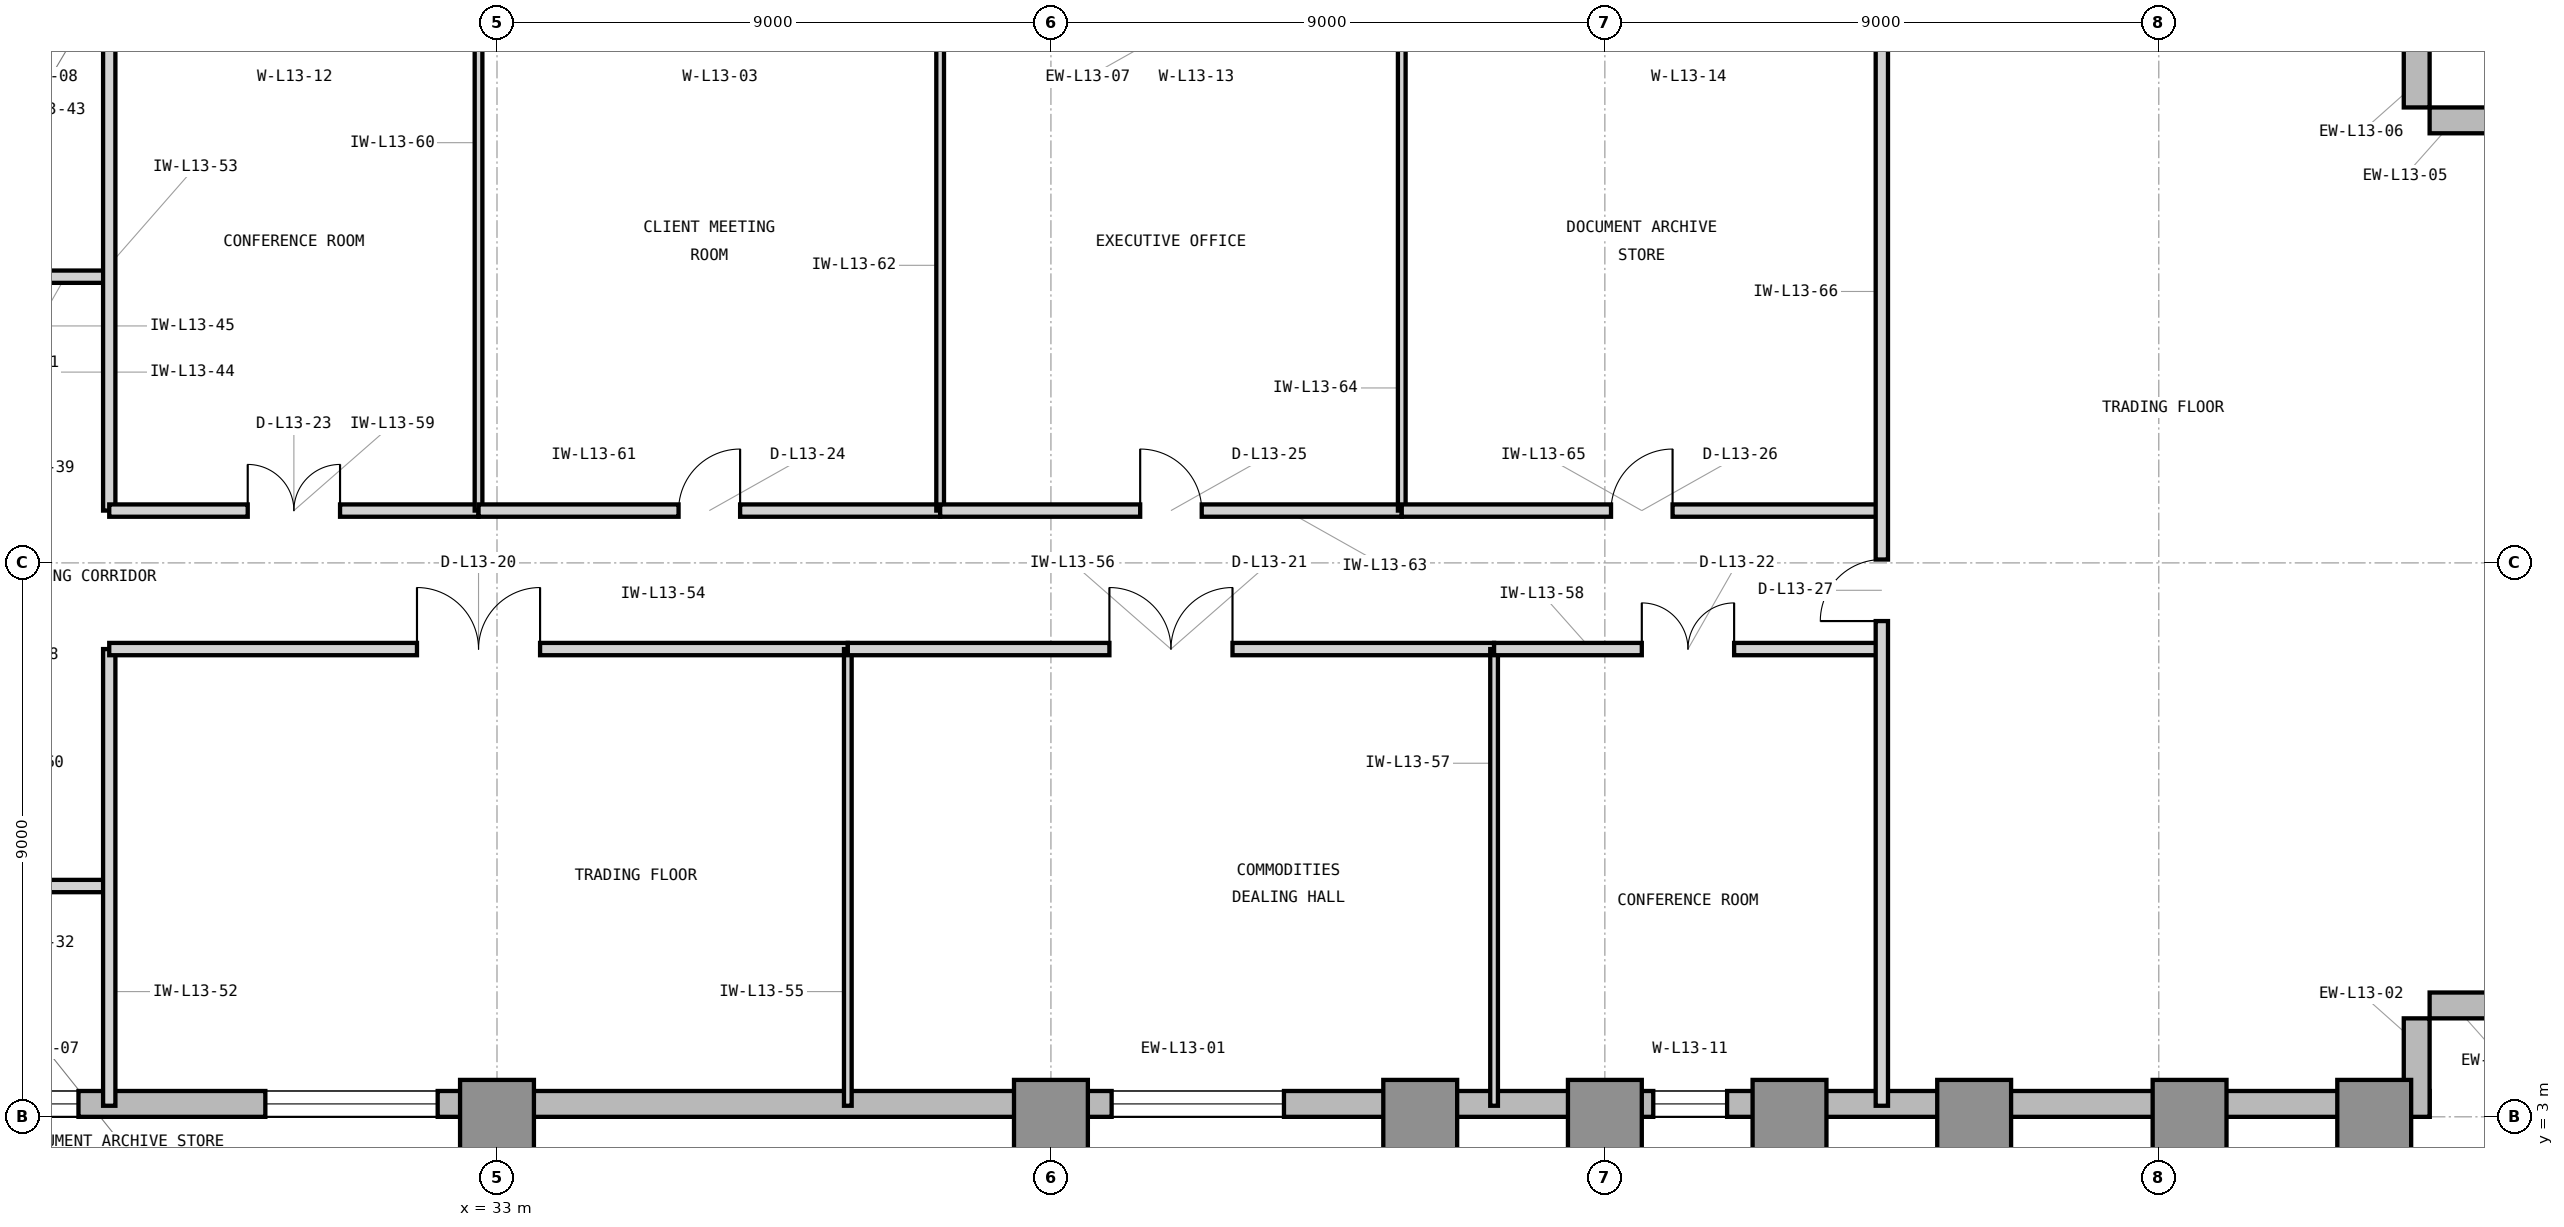
"""IFC4 building model, lengths in metres.
Left out: names, types, materials, properties, quantities, classifications, styles, units other than length and angle.
Written with IfcOpenShell. Run it as: python <this file> out.ifc"""

import sys

from ifc_helpers import new_model, si_unit, direction, frame, frame_2d, origin, origin_2d, place, context, subcontext, project, spatial, rectangle, extrude, element, fill, save


model = new_model("IFC4")
c1 = context("Model", 3, precision=1e-05, world=origin(), true_north=direction((0.0, 1.0)))
c2 = subcontext(c1, "Body", "Model", "MODEL_VIEW")
j1 = project(units=[si_unit("LENGTHUNIT", "METRE"), si_unit("PLANEANGLEUNIT", "RADIAN")], contexts=[c1])
p1 = place(None, origin())
s1 = spatial("IfcSite", under=j1, at=p1, CompositionType="ELEMENT")
p2 = place(p1, origin())
s2 = spatial("IfcBuilding", under=s1, at=p2, CompositionType="ELEMENT")
p3 = place(p2, frame((0.0, 0.0, 59.4)))
s3 = spatial("IfcBuildingStorey", under=s2, at=p3, CompositionType="ELEMENT", Elevation=59.4)
for number, where, z_axis, x_axis in (
    (1, (33.0, 3.0, 0.0), (0.0, 0.0, 1.0), (1.0, 0.0, 0.0)),
    (2, (42.0, 3.0, 0.0), (0.0, 0.0, 1.0), (1.0, 0.0, 0.0)),
    (3, (48.0, 3.0, 0.0), (0.0, 0.0, 1.0), (1.0, 0.0, 0.0)),
    (4, (51.0, 3.0, 0.0), (0.0, 0.0, 1.0), (1.0, 0.0, 0.0)),
    (5, (54.0, 3.0, 0.0), (0.0, 0.0, 1.0), (1.0, 0.0, 0.0)),
    (6, (57.0, 3.0, 0.0), (0.0, 0.0, 1.0), (1.0, 0.0, 0.0)),
    (7, (60.5, 3.0, 0.0), (0.0, 0.0, 1.0), (1.0, 0.0, 0.0)),
    (8, (63.5, 3.0, 0.0), (0.0, 0.0, 1.0), (1.0, 0.0, 0.0)),
):
    element("IfcColumn", number, at=place(p3, frame(where, z_axis=z_axis, x_axis=x_axis)), inside=s3, PredefinedType="COLUMN", context=c2, shape_type="SweptSolid", body=[
        extrude(rectangle(XDim=1.2, YDim=1.2, at=origin_2d()), origin(), (0.0, 0.0, 1.0), 4.2),
    ])
p4 = place(p3, frame((23.9, 3.21, 0.0), z_axis=(0.0, 0.0, 1.0), x_axis=(1.0, 0.0, 0.0)))
e9 = element("IfcWall", 9, at=p4, inside=s3, PredefinedType="STANDARD", context=c2, shape_type="SweptSolid", body=[
    extrude(rectangle(XDim=40.5, YDim=0.42, at=frame_2d((20.25, 0.0))), origin(), (0.0, 0.0, 1.0), 3.98),
])
p5 = place(p4, frame((1.1, 0.0, 0.85)))
e10 = element("IfcOpeningElement", 10, at=p5, cuts=e9, PredefinedType="OPENING", context=c2, shape_type="SweptSolid", body=[
    extrude(rectangle(XDim=1.2, YDim=2.45, at=frame_2d((0.6, 1.225))), frame((0.0, 0.22, 0.0), z_axis=(0.0, -1.0, 0.0), x_axis=(1.0, 0.0, 0.0)), (0.0, 0.0, 1.0), 0.44),
])
p6 = place(p4, frame((5.336, 0.0, 0.85)))
e11 = element("IfcOpeningElement", 11, at=p6, cuts=e9, PredefinedType="OPENING", context=c2, shape_type="SweptSolid", body=[
    extrude(rectangle(XDim=2.8, YDim=2.45, at=frame_2d((1.4, 1.225))), frame((0.0, 0.22, 0.0), z_axis=(0.0, -1.0, 0.0), x_axis=(1.0, 0.0, 0.0)), (0.0, 0.0, 1.0), 0.44),
])
p7 = place(p4, frame((19.086, 0.0, 0.85)))
e12 = element("IfcOpeningElement", 12, at=p7, cuts=e9, PredefinedType="OPENING", context=c2, shape_type="SweptSolid", body=[
    extrude(rectangle(XDim=2.8, YDim=2.45, at=frame_2d((1.4, 1.225))), frame((0.0, 0.22, 0.0), z_axis=(0.0, -1.0, 0.0), x_axis=(1.0, 0.0, 0.0)), (0.0, 0.0, 1.0), 0.44),
])
p8 = place(p4, frame((27.886, 0.0, 0.85)))
e13 = element("IfcOpeningElement", 13, at=p8, cuts=e9, PredefinedType="OPENING", context=c2, shape_type="SweptSolid", body=[
    extrude(rectangle(XDim=1.2, YDim=2.45, at=frame_2d((0.6, 1.225))), frame((0.0, 0.22, 0.0), z_axis=(0.0, -1.0, 0.0), x_axis=(1.0, 0.0, 0.0)), (0.0, 0.0, 1.0), 0.44),
])
for number, where, z_axis, x_axis in (
    (14, (64.19, 3.0, 0.0), (0.0, 0.0, 1.0), (0.0, 1.0, 0.0)),
    (15, (64.4, 4.81, 0.0), (0.0, 0.0, 1.0), (1.0, 0.0, 0.0)),
    (16, (66.0, 19.19, 0.0), (0.0, 0.0, 1.0), (-1.0, 0.0, 0.0)),
    (17, (64.19, 19.4, 0.0), (0.0, 0.0, 1.0), (0.0, 1.0, 0.0)),
):
    element("IfcWall", number, at=place(p3, frame(where, z_axis=z_axis, x_axis=x_axis)), inside=s3, PredefinedType="STANDARD", context=c2, shape_type="SweptSolid", body=[
        extrude(rectangle(XDim=1.6, YDim=0.42, at=frame_2d((0.8, 0.0))), origin(), (0.0, 0.0, 1.0), 3.98),
    ])
p9 = place(p3, frame((23.85, 6.75, 0.0), z_axis=(0.0, 0.0, 1.0), x_axis=(1.0, 0.0, 0.0)))
e18 = element("IfcWall", 18, at=p9, inside=s3, PredefinedType="PARTITIONING", context=c2, shape_type="SweptSolid", body=[
    extrude(rectangle(XDim=2.85, YDim=0.2, at=frame_2d((1.425, 0.0))), origin(), (0.0, 0.0, 1.0), 3.97),
])
p10 = place(p9, frame((0.7, 0.0, 0.0)))
e19 = element("IfcOpeningElement", 19, at=p10, cuts=e18, PredefinedType="OPENING", context=c2, shape_type="SweptSolid", body=[
    extrude(rectangle(XDim=1.0, YDim=2.15, at=frame_2d((0.5, 1.075))), frame((0.0, 0.11, 0.0), z_axis=(0.0, -1.0, 0.0), x_axis=(1.0, 0.0, 0.0)), (0.0, 0.0, 1.0), 0.22),
])
p11 = place(p3, frame((23.85, 16.65, 0.0), z_axis=(0.0, 0.0, 1.0), x_axis=(1.0, 0.0, 0.0)))
e20 = element("IfcWall", 20, at=p11, inside=s3, PredefinedType="PARTITIONING", context=c2, shape_type="SweptSolid", body=[
    extrude(rectangle(XDim=2.85, YDim=0.2, at=frame_2d((1.425, 0.0))), origin(), (0.0, 0.0, 1.0), 3.97),
])
p12 = place(p11, frame((0.7, 0.0, 0.0)))
e21 = element("IfcOpeningElement", 21, at=p12, cuts=e20, PredefinedType="OPENING", context=c2, shape_type="SweptSolid", body=[
    extrude(rectangle(XDim=1.0, YDim=2.15, at=frame_2d((0.5, 1.075))), frame((0.0, 0.11, 0.0), z_axis=(0.0, -1.0, 0.0), x_axis=(1.0, 0.0, 0.0)), (0.0, 0.0, 1.0), 0.22),
])
p13 = place(p3, frame((26.7, 3.18, 0.0), z_axis=(0.0, 0.0, 1.0), x_axis=(0.0, 1.0, 0.0)))
e22 = element("IfcWall", 22, at=p13, inside=s3, PredefinedType="PARTITIONING", context=c2, shape_type="SweptSolid", body=[
    extrude(rectangle(XDim=7.42, YDim=0.2, at=frame_2d((3.71, 0.0))), origin(), (0.0, 0.0, 1.0), 3.97),
])
p14 = place(p3, frame((26.7, 12.85, 0.0), z_axis=(0.0, 0.0, 1.0), x_axis=(0.0, 1.0, 0.0)))
e23 = element("IfcWall", 23, at=p14, inside=s3, PredefinedType="PARTITIONING", context=c2, shape_type="SweptSolid", body=[
    extrude(rectangle(XDim=7.97, YDim=0.2, at=frame_2d((3.985, 0.0))), origin(), (0.0, 0.0, 1.0), 3.97),
])
p15 = place(p3, frame((26.7, 10.6, 0.0), z_axis=(0.0, 0.0, 1.0), x_axis=(1.0, 0.0, 0.0)))
e24 = element("IfcWall", 24, at=p15, inside=s3, PredefinedType="PARTITIONING", context=c2, shape_type="SweptSolid", body=[
    extrude(rectangle(XDim=12.0, YDim=0.2, at=frame_2d((6.0, 0.0))), origin(), (0.0, 0.0, 1.0), 3.97),
])
p16 = place(p15, frame((5.0, 0.0, 0.0)))
e25 = element("IfcOpeningElement", 25, at=p16, cuts=e24, PredefinedType="OPENING", context=c2, shape_type="SweptSolid", body=[
    extrude(rectangle(XDim=2.0, YDim=2.5, at=frame_2d((1.0, 1.25))), frame((0.0, 0.11, 0.0), z_axis=(0.0, -1.0, 0.0), x_axis=(1.0, 0.0, 0.0)), (0.0, 0.0, 1.0), 0.22),
])
p17 = place(p3, frame((38.7, 3.18, 0.0), z_axis=(0.0, 0.0, 1.0), x_axis=(0.0, 1.0, 0.0)))
e26 = element("IfcWall", 26, at=p17, inside=s3, PredefinedType="PARTITIONING", context=c2, shape_type="SweptSolid", body=[
    extrude(rectangle(XDim=7.42, YDim=0.125, at=frame_2d((3.71, 0.0))), origin(), (0.0, 0.0, 1.0), 3.97),
])
p18 = place(p3, frame((38.7, 10.6, 0.0), z_axis=(0.0, 0.0, 1.0), x_axis=(1.0, 0.0, 0.0)))
e27 = element("IfcWall", 27, at=p18, inside=s3, PredefinedType="PARTITIONING", context=c2, shape_type="SweptSolid", body=[
    extrude(rectangle(XDim=10.5, YDim=0.2, at=frame_2d((5.25, 0.0))), origin(), (0.0, 0.0, 1.0), 3.97),
])
p19 = place(p18, frame((4.25, 0.0, 0.0)))
e28 = element("IfcOpeningElement", 28, at=p19, cuts=e27, PredefinedType="OPENING", context=c2, shape_type="SweptSolid", body=[
    extrude(rectangle(XDim=2.0, YDim=2.5, at=frame_2d((1.0, 1.25))), frame((0.0, 0.11, 0.0), z_axis=(0.0, -1.0, 0.0), x_axis=(1.0, 0.0, 0.0)), (0.0, 0.0, 1.0), 0.22),
])
p20 = place(p3, frame((49.2, 3.18, 0.0), z_axis=(0.0, 0.0, 1.0), x_axis=(0.0, 1.0, 0.0)))
e29 = element("IfcWall", 29, at=p20, inside=s3, PredefinedType="PARTITIONING", context=c2, shape_type="SweptSolid", body=[
    extrude(rectangle(XDim=7.42, YDim=0.125, at=frame_2d((3.71, 0.0))), origin(), (0.0, 0.0, 1.0), 3.97),
])
p21 = place(p3, frame((49.2, 10.6, 0.0), z_axis=(0.0, 0.0, 1.0), x_axis=(1.0, 0.0, 0.0)))
e30 = element("IfcWall", 30, at=p21, inside=s3, PredefinedType="PARTITIONING", context=c2, shape_type="SweptSolid", body=[
    extrude(rectangle(XDim=6.3, YDim=0.2, at=frame_2d((3.15, 0.0))), origin(), (0.0, 0.0, 1.0), 3.97),
])
p22 = place(p21, frame((2.4, 0.0, 0.0)))
e31 = element("IfcOpeningElement", 31, at=p22, cuts=e30, PredefinedType="OPENING", context=c2, shape_type="SweptSolid", body=[
    extrude(rectangle(XDim=1.5, YDim=2.3, at=frame_2d((0.75, 1.15))), frame((0.0, 0.11, 0.0), z_axis=(0.0, -1.0, 0.0), x_axis=(1.0, 0.0, 0.0)), (0.0, 0.0, 1.0), 0.22),
])
p23 = place(p3, frame((26.7, 12.85, 0.0), z_axis=(0.0, 0.0, 1.0), x_axis=(1.0, 0.0, 0.0)))
e32 = element("IfcWall", 32, at=p23, inside=s3, PredefinedType="PARTITIONING", context=c2, shape_type="SweptSolid", body=[
    extrude(rectangle(XDim=6.0, YDim=0.2, at=frame_2d((3.0, 0.0))), origin(), (0.0, 0.0, 1.0), 3.97),
])
p24 = place(p23, frame((2.25, 0.0, 0.0)))
e33 = element("IfcOpeningElement", 33, at=p24, cuts=e32, PredefinedType="OPENING", context=c2, shape_type="SweptSolid", body=[
    extrude(rectangle(XDim=1.5, YDim=2.3, at=frame_2d((0.75, 1.15))), frame((0.0, 0.11, 0.0), z_axis=(0.0, -1.0, 0.0), x_axis=(1.0, 0.0, 0.0)), (0.0, 0.0, 1.0), 0.22),
])
p25 = place(p3, frame((32.7, 12.85, 0.0), z_axis=(0.0, 0.0, 1.0), x_axis=(0.0, 1.0, 0.0)))
e34 = element("IfcWall", 34, at=p25, inside=s3, PredefinedType="PARTITIONING", context=c2, shape_type="SweptSolid", body=[
    extrude(rectangle(XDim=7.97, YDim=0.125, at=frame_2d((3.985, 0.0))), origin(), (0.0, 0.0, 1.0), 3.97),
])
p26 = place(p3, frame((32.7, 12.85, 0.0), z_axis=(0.0, 0.0, 1.0), x_axis=(1.0, 0.0, 0.0)))
e35 = element("IfcWall", 35, at=p26, inside=s3, PredefinedType="PARTITIONING", context=c2, shape_type="SweptSolid", body=[
    extrude(rectangle(XDim=7.5, YDim=0.2, at=frame_2d((3.75, 0.0))), origin(), (0.0, 0.0, 1.0), 3.97),
])
p27 = place(p26, frame((3.25, 0.0, 0.0)))
e36 = element("IfcOpeningElement", 36, at=p27, cuts=e35, PredefinedType="OPENING", context=c2, shape_type="SweptSolid", body=[
    extrude(rectangle(XDim=1.0, YDim=2.15, at=frame_2d((0.5, 1.075))), frame((0.0, 0.11, 0.0), z_axis=(0.0, -1.0, 0.0), x_axis=(1.0, 0.0, 0.0)), (0.0, 0.0, 1.0), 0.22),
])
p28 = place(p3, frame((40.2, 12.85, 0.0), z_axis=(0.0, 0.0, 1.0), x_axis=(0.0, 1.0, 0.0)))
e37 = element("IfcWall", 37, at=p28, inside=s3, PredefinedType="PARTITIONING", context=c2, shape_type="SweptSolid", body=[
    extrude(rectangle(XDim=7.97, YDim=0.125, at=frame_2d((3.985, 0.0))), origin(), (0.0, 0.0, 1.0), 3.97),
])
p29 = place(p3, frame((40.2, 12.85, 0.0), z_axis=(0.0, 0.0, 1.0), x_axis=(1.0, 0.0, 0.0)))
e38 = element("IfcWall", 38, at=p29, inside=s3, PredefinedType="PARTITIONING", context=c2, shape_type="SweptSolid", body=[
    extrude(rectangle(XDim=7.5, YDim=0.2, at=frame_2d((3.75, 0.0))), origin(), (0.0, 0.0, 1.0), 3.97),
])
p30 = place(p29, frame((3.25, 0.0, 0.0)))
e39 = element("IfcOpeningElement", 39, at=p30, cuts=e38, PredefinedType="OPENING", context=c2, shape_type="SweptSolid", body=[
    extrude(rectangle(XDim=1.0, YDim=2.15, at=frame_2d((0.5, 1.075))), frame((0.0, 0.11, 0.0), z_axis=(0.0, -1.0, 0.0), x_axis=(1.0, 0.0, 0.0)), (0.0, 0.0, 1.0), 0.22),
])
p31 = place(p3, frame((47.7, 12.85, 0.0), z_axis=(0.0, 0.0, 1.0), x_axis=(0.0, 1.0, 0.0)))
e40 = element("IfcWall", 40, at=p31, inside=s3, PredefinedType="PARTITIONING", context=c2, shape_type="SweptSolid", body=[
    extrude(rectangle(XDim=7.97, YDim=0.125, at=frame_2d((3.985, 0.0))), origin(), (0.0, 0.0, 1.0), 3.97),
])
p32 = place(p3, frame((47.7, 12.85, 0.0), z_axis=(0.0, 0.0, 1.0), x_axis=(1.0, 0.0, 0.0)))
e41 = element("IfcWall", 41, at=p32, inside=s3, PredefinedType="PARTITIONING", context=c2, shape_type="SweptSolid", body=[
    extrude(rectangle(XDim=7.8, YDim=0.2, at=frame_2d((3.9, 0.0))), origin(), (0.0, 0.0, 1.0), 3.97),
])
p33 = place(p32, frame((3.4, 0.0, 0.0)))
e42 = element("IfcOpeningElement", 42, at=p33, cuts=e41, PredefinedType="OPENING", context=c2, shape_type="SweptSolid", body=[
    extrude(rectangle(XDim=1.0, YDim=2.15, at=frame_2d((0.5, 1.075))), frame((0.0, 0.11, 0.0), z_axis=(0.0, -1.0, 0.0), x_axis=(1.0, 0.0, 0.0)), (0.0, 0.0, 1.0), 0.22),
])
p34 = place(p3, frame((55.5, 3.18, 0.0), z_axis=(0.0, 0.0, 1.0), x_axis=(0.0, 1.0, 0.0)))
e43 = element("IfcWall", 43, at=p34, inside=s3, PredefinedType="PARTITIONING", context=c2, shape_type="SweptSolid", body=[
    extrude(rectangle(XDim=17.64, YDim=0.2, at=frame_2d((8.82, 0.0))), origin(), (0.0, 0.0, 1.0), 3.97),
])
p35 = place(p34, frame((7.875, 0.0, 0.0)))
e44 = element("IfcOpeningElement", 44, at=p35, cuts=e43, PredefinedType="OPENING", context=c2, shape_type="SweptSolid", body=[
    extrude(rectangle(XDim=1.0, YDim=2.15, at=frame_2d((0.5, 1.075))), frame((0.0, 0.11, 0.0), z_axis=(0.0, -1.0, 0.0), x_axis=(1.0, 0.0, 0.0)), (0.0, 0.0, 1.0), 0.22),
])
p36 = place(p16, origin())
e45 = element("IfcDoor", 45, at=p36, inside=s3, OperationType="DOUBLE_DOOR_SINGLE_SWING", PredefinedType="DOOR", context=c2, shape_type="SweptSolid", body=[
    extrude(rectangle(XDim=2.0, YDim=2.5, at=frame_2d((1.0, 1.25))), frame((0.0, 0.025, 0.0), z_axis=(0.0, -1.0, 0.0), x_axis=(1.0, 0.0, 0.0)), (0.0, 0.0, 1.0), 0.05),
])
fill(e25, e45)
p37 = place(p19, origin())
e46 = element("IfcDoor", 46, at=p37, inside=s3, OperationType="DOUBLE_DOOR_SINGLE_SWING", PredefinedType="DOOR", context=c2, shape_type="SweptSolid", body=[
    extrude(rectangle(XDim=2.0, YDim=2.5, at=frame_2d((1.0, 1.25))), frame((0.0, 0.025, 0.0), z_axis=(0.0, -1.0, 0.0), x_axis=(1.0, 0.0, 0.0)), (0.0, 0.0, 1.0), 0.05),
])
fill(e28, e46)
p38 = place(p22, origin())
e47 = element("IfcDoor", 47, at=p38, inside=s3, OperationType="DOUBLE_DOOR_SINGLE_SWING", PredefinedType="DOOR", context=c2, shape_type="SweptSolid", body=[
    extrude(rectangle(XDim=1.5, YDim=2.3, at=frame_2d((0.75, 1.15))), frame((0.0, 0.025, 0.0), z_axis=(0.0, -1.0, 0.0), x_axis=(1.0, 0.0, 0.0)), (0.0, 0.0, 1.0), 0.05),
])
fill(e31, e47)
p39 = place(p24, origin())
e48 = element("IfcDoor", 48, at=p39, inside=s3, OperationType="DOUBLE_DOOR_SINGLE_SWING", PredefinedType="DOOR", context=c2, shape_type="SweptSolid", body=[
    extrude(rectangle(XDim=1.5, YDim=2.3, at=frame_2d((0.75, 1.15))), frame((0.0, 0.025, 0.0), z_axis=(0.0, -1.0, 0.0), x_axis=(1.0, 0.0, 0.0)), (0.0, 0.0, 1.0), 0.05),
])
fill(e33, e48)
p40 = place(p27, origin())
e49 = element("IfcDoor", 49, at=p40, inside=s3, OperationType="SINGLE_SWING_RIGHT", PredefinedType="DOOR", context=c2, shape_type="SweptSolid", body=[
    extrude(rectangle(XDim=1.0, YDim=2.15, at=frame_2d((0.5, 1.075))), frame((0.0, 0.025, 0.0), z_axis=(0.0, -1.0, 0.0), x_axis=(1.0, 0.0, 0.0)), (0.0, 0.0, 1.0), 0.05),
])
fill(e36, e49)
p41 = place(p30, origin())
e50 = element("IfcDoor", 50, at=p41, inside=s3, OperationType="SINGLE_SWING_LEFT", PredefinedType="DOOR", context=c2, shape_type="SweptSolid", body=[
    extrude(rectangle(XDim=1.0, YDim=2.15, at=frame_2d((0.5, 1.075))), frame((0.0, 0.025, 0.0), z_axis=(0.0, -1.0, 0.0), x_axis=(1.0, 0.0, 0.0)), (0.0, 0.0, 1.0), 0.05),
])
fill(e39, e50)
p42 = place(p33, origin())
e51 = element("IfcDoor", 51, at=p42, inside=s3, OperationType="SINGLE_SWING_RIGHT", PredefinedType="DOOR", context=c2, shape_type="SweptSolid", body=[
    extrude(rectangle(XDim=1.0, YDim=2.15, at=frame_2d((0.5, 1.075))), frame((0.0, 0.025, 0.0), z_axis=(0.0, -1.0, 0.0), x_axis=(1.0, 0.0, 0.0)), (0.0, 0.0, 1.0), 0.05),
])
fill(e42, e51)
p43 = place(p35, origin())
e52 = element("IfcDoor", 52, at=p43, inside=s3, OperationType="SINGLE_SWING_LEFT", PredefinedType="DOOR", context=c2, shape_type="SweptSolid", body=[
    extrude(rectangle(XDim=1.0, YDim=2.15, at=frame_2d((0.5, 1.075))), frame((0.0, 0.025, 0.0), z_axis=(0.0, -1.0, 0.0), x_axis=(1.0, 0.0, 0.0)), (0.0, 0.0, 1.0), 0.05),
])
fill(e44, e52)
p44 = place(p5, origin())
e53 = element("IfcWindow", 53, at=p44, inside=s3, PartitioningType="SINGLE_PANEL", PredefinedType="WINDOW", context=c2, shape_type="SweptSolid", body=[
    extrude(rectangle(XDim=1.2, YDim=2.45, at=frame_2d((0.6, 1.225))), frame((0.0, 0.11, 0.0), z_axis=(0.0, -1.0, 0.0), x_axis=(1.0, 0.0, 0.0)), (0.0, 0.0, 1.0), 0.06),
])
fill(e10, e53)
p45 = place(p6, origin())
e54 = element("IfcWindow", 54, at=p45, inside=s3, PartitioningType="SINGLE_PANEL", PredefinedType="WINDOW", context=c2, shape_type="SweptSolid", body=[
    extrude(rectangle(XDim=2.8, YDim=2.45, at=frame_2d((1.4, 1.225))), frame((0.0, 0.11, 0.0), z_axis=(0.0, -1.0, 0.0), x_axis=(1.0, 0.0, 0.0)), (0.0, 0.0, 1.0), 0.06),
])
fill(e11, e54)
p46 = place(p7, origin())
e55 = element("IfcWindow", 55, at=p46, inside=s3, PartitioningType="SINGLE_PANEL", PredefinedType="WINDOW", context=c2, shape_type="SweptSolid", body=[
    extrude(rectangle(XDim=2.8, YDim=2.45, at=frame_2d((1.4, 1.225))), frame((0.0, 0.11, 0.0), z_axis=(0.0, -1.0, 0.0), x_axis=(1.0, 0.0, 0.0)), (0.0, 0.0, 1.0), 0.06),
])
fill(e12, e55)
p47 = place(p8, origin())
e56 = element("IfcWindow", 56, at=p47, inside=s3, PartitioningType="SINGLE_PANEL", PredefinedType="WINDOW", context=c2, shape_type="SweptSolid", body=[
    extrude(rectangle(XDim=1.2, YDim=2.45, at=frame_2d((0.6, 1.225))), frame((0.0, 0.11, 0.0), z_axis=(0.0, -1.0, 0.0), x_axis=(1.0, 0.0, 0.0)), (0.0, 0.0, 1.0), 0.06),
])
fill(e13, e56)
save(model, sys.argv[1])
